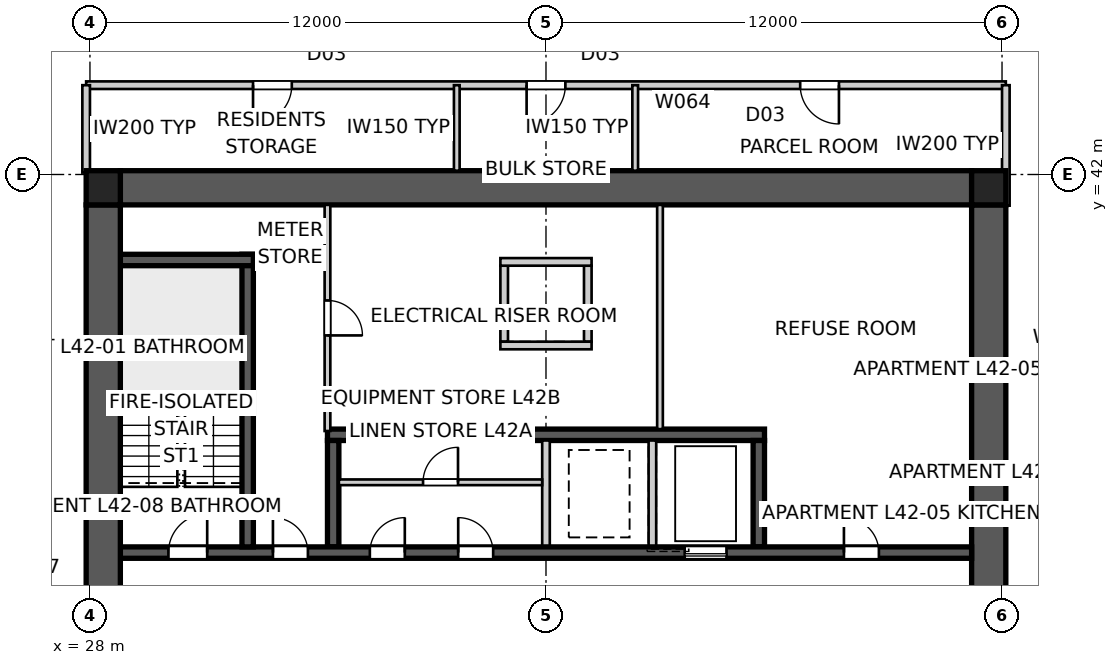
"""IFC4 building model, lengths in metres.
Left out: names, types, materials, properties, quantities, classifications, styles, units other than length and angle.
Written with IfcOpenShell. Run it as: python <this file> out.ifc"""

import sys

from ifc_helpers import new_model, si_unit, direction, frame, frame_2d, origin, origin_2d, place, context, subcontext, project, spatial, polyline, rectangle, outline, extrude, element, fill, save


model = new_model("IFC4")
c1 = context("Model", 3, precision=1e-05, world=origin(), true_north=direction((0.0, 1.0)))
c2 = subcontext(c1, "Body", "Model", "MODEL_VIEW")
j1 = project(units=[si_unit("LENGTHUNIT", "METRE"), si_unit("PLANEANGLEUNIT", "RADIAN")], contexts=[c1])
p1 = place(None, origin())
s1 = spatial("IfcSite", under=j1, at=p1, CompositionType="ELEMENT")
p2 = place(p1, origin())
s2 = spatial("IfcBuilding", under=s1, at=p2, CompositionType="ELEMENT")
p3 = place(p2, frame((0.0, 0.0, 154.0)))
s3 = spatial("IfcBuildingStorey", under=s2, at=p3, CompositionType="ELEMENT", Elevation=154.0)
p4 = place(p3, frame((28.8, 41.65, 0.0), z_axis=(0.0, 0.0, 1.0), x_axis=(1.0, 0.0, 0.0)))
e1 = element("IfcWall", 1, at=p4, inside=s3, PredefinedType="SHEAR", context=c2, shape_type="SweptSolid", body=[
    extrude(outline(polyline([(0.0, -0.45), (22.4, -0.45), (22.4, -0.025), (22.85, -0.025), (22.85, 0.025), (22.4, 0.025), (22.4, 0.45), (0.0, 0.45), (0.0, 0.025), (-0.45, 0.025), (-0.45, -0.025), (0.0, -0.025), (0.0, -0.45)])), origin(), (0.0, 0.0, 1.0), 3.4),
])
p5 = place(p3, frame((51.65, 18.8, 0.0), z_axis=(0.0, 0.0, 1.0), x_axis=(0.0, 1.0, 0.0)))
e2 = element("IfcWall", 2, at=p5, inside=s3, PredefinedType="SHEAR", context=c2, shape_type="SweptSolid", body=[
    extrude(outline(polyline([(0.0, -0.45), (22.4, -0.45), (22.4, -0.025), (22.85, -0.025), (22.85, 0.025), (22.4, 0.025), (22.4, 0.45), (0.0, 0.45), (0.0, 0.025), (-0.45, 0.025), (-0.45, -0.025), (0.0, -0.025), (0.0, -0.45)])), origin(), (0.0, 0.0, 1.0), 3.4),
])
p6 = place(p5, frame((11.14, 0.0, 0.0)))
e3 = element("IfcOpeningElement", 3, at=p6, cuts=e2, PredefinedType="OPENING", context=c2, shape_type="SweptSolid", body=[
    extrude(rectangle(XDim=1.02, YDim=2.4, at=frame_2d((0.51, 1.2))), frame((0.0, 0.46, 0.0), z_axis=(0.0, -1.0, 0.0), x_axis=(1.0, 0.0, 0.0)), (0.0, 0.0, 1.0), 0.92),
])
p7 = place(p3, frame((28.35, 41.2, 0.0), z_axis=(0.0, 0.0, 1.0), x_axis=(0.0, -1.0, 0.0)))
e4 = element("IfcWall", 4, at=p7, inside=s3, PredefinedType="SHEAR", context=c2, shape_type="SweptSolid", body=[
    extrude(outline(polyline([(0.0, -0.45), (22.4, -0.45), (22.4, -0.025), (22.85, -0.025), (22.85, 0.025), (22.4, 0.025), (22.4, 0.45), (0.0, 0.45), (0.0, 0.025), (-0.45, 0.025), (-0.45, -0.025), (0.0, -0.025), (0.0, -0.45)])), origin(), (0.0, 0.0, 1.0), 3.4),
])
p8 = place(p7, frame((11.14, 0.0, 0.0)))
e5 = element("IfcOpeningElement", 5, at=p8, cuts=e4, PredefinedType="OPENING", context=c2, shape_type="SweptSolid", body=[
    extrude(rectangle(XDim=1.02, YDim=2.4, at=frame_2d((0.51, 1.2))), frame((0.0, 0.46, 0.0), z_axis=(0.0, -1.0, 0.0), x_axis=(1.0, 0.0, 0.0)), (0.0, 0.0, 1.0), 0.92),
])
p9 = place(p3, frame((28.8, 32.05, 0.0), z_axis=(0.0, 0.0, 1.0), x_axis=(1.0, 0.0, 0.0)))
e6 = element("IfcWall", 6, at=p9, inside=s3, PredefinedType="SHEAR", context=c2, shape_type="SweptSolid", body=[
    extrude(rectangle(XDim=22.4, YDim=0.3, at=frame_2d((11.2, 0.0))), origin(), (0.0, 0.0, 1.0), 3.4),
])
p10 = place(p9, frame((19.04, 0.0, 0.0)))
e7 = element("IfcOpeningElement", 7, at=p10, cuts=e6, PredefinedType="OPENING", context=c2, shape_type="SweptSolid", body=[
    extrude(rectangle(XDim=0.92, YDim=2.1, at=frame_2d((0.46, 1.05))), frame((0.0, 0.16, 0.0), z_axis=(0.0, -1.0, 0.0), x_axis=(1.0, 0.0, 0.0)), (0.0, 0.0, 1.0), 0.32),
])
p11 = place(p9, frame((1.265, 0.0, 0.0)))
e8 = element("IfcOpeningElement", 8, at=p11, cuts=e6, PredefinedType="OPENING", context=c2, shape_type="SweptSolid", body=[
    extrude(rectangle(XDim=1.02, YDim=2.1, at=frame_2d((0.51, 1.05))), frame((0.0, 0.16, 0.0), z_axis=(0.0, -1.0, 0.0), x_axis=(1.0, 0.0, 0.0)), (0.0, 0.0, 1.0), 0.32),
])
p12 = place(p9, frame((4.015, 0.0, 0.0)))
e9 = element("IfcOpeningElement", 9, at=p12, cuts=e6, PredefinedType="OPENING", context=c2, shape_type="SweptSolid", body=[
    extrude(rectangle(XDim=0.92, YDim=2.1, at=frame_2d((0.46, 1.05))), frame((0.0, 0.16, 0.0), z_axis=(0.0, -1.0, 0.0), x_axis=(1.0, 0.0, 0.0)), (0.0, 0.0, 1.0), 0.32),
])
p13 = place(p9, frame((6.565, 0.0, 0.0)))
e10 = element("IfcOpeningElement", 10, at=p13, cuts=e6, PredefinedType="OPENING", context=c2, shape_type="SweptSolid", body=[
    extrude(rectangle(XDim=0.92, YDim=2.1, at=frame_2d((0.46, 1.05))), frame((0.0, 0.16, 0.0), z_axis=(0.0, -1.0, 0.0), x_axis=(1.0, 0.0, 0.0)), (0.0, 0.0, 1.0), 0.32),
])
p14 = place(p9, frame((8.89, 0.0, 0.0)))
e11 = element("IfcOpeningElement", 11, at=p14, cuts=e6, PredefinedType="OPENING", context=c2, shape_type="SweptSolid", body=[
    extrude(rectangle(XDim=0.92, YDim=2.1, at=frame_2d((0.46, 1.05))), frame((0.0, 0.16, 0.0), z_axis=(0.0, -1.0, 0.0), x_axis=(1.0, 0.0, 0.0)), (0.0, 0.0, 1.0), 0.32),
])
p15 = place(p9, frame((14.85, 0.0, 0.0)))
e12 = element("IfcOpeningElement", 12, at=p15, cuts=e6, PredefinedType="OPENING", context=c2, shape_type="SweptSolid", body=[
    extrude(rectangle(XDim=1.1, YDim=2.1, at=frame_2d((0.55, 1.05))), frame((0.0, 0.16, 0.0), z_axis=(0.0, -1.0, 0.0), x_axis=(1.0, 0.0, 0.0)), (0.0, 0.0, 1.0), 0.32),
])
p16 = place(p3, frame((34.25, 35.15, 0.0), z_axis=(0.0, 0.0, 1.0), x_axis=(1.0, 0.0, 0.0)))
e13 = element("IfcWall", 13, at=p16, inside=s3, PredefinedType="SHEAR", context=c2, shape_type="SweptSolid", body=[
    extrude(rectangle(XDim=11.5, YDim=0.3, at=frame_2d((5.75, 0.0))), origin(), (0.0, 0.0, 1.0), 3.4),
])
p17 = place(p3, frame((34.4, 32.2, 0.0), z_axis=(0.0, 0.0, 1.0), x_axis=(0.0, 1.0, 0.0)))
e14 = element("IfcWall", 14, at=p17, inside=s3, PredefinedType="SHEAR", context=c2, shape_type="SweptSolid", body=[
    extrude(rectangle(XDim=2.8, YDim=0.3, at=frame_2d((1.4, 0.0))), origin(), (0.0, 0.0, 1.0), 3.4),
])
for number, where, z_axis, x_axis in (
    (15, (40.0, 32.2, 0.0), (0.0, 0.0, 1.0), (0.0, 1.0, 0.0)),
    (16, (42.8, 32.2, 0.0), (0.0, 0.0, 1.0), (0.0, 1.0, 0.0)),
):
    element("IfcWall", number, at=place(p3, frame(where, z_axis=z_axis, x_axis=x_axis)), inside=s3, PredefinedType="SOLIDWALL", context=c2, shape_type="SweptSolid", body=[
        extrude(rectangle(XDim=2.8, YDim=0.2, at=frame_2d((1.4, 0.0))), origin(), (0.0, 0.0, 1.0), 3.4),
    ])
p18 = place(p3, frame((45.6, 32.2, 0.0), z_axis=(0.0, 0.0, 1.0), x_axis=(0.0, 1.0, 0.0)))
e17 = element("IfcWall", 17, at=p18, inside=s3, PredefinedType="SHEAR", context=c2, shape_type="SweptSolid", body=[
    extrude(rectangle(XDim=2.8, YDim=0.3, at=frame_2d((1.4, 0.0))), origin(), (0.0, 0.0, 1.0), 3.4),
])
p19 = place(p3, frame((32.15, 32.2, 0.0), z_axis=(0.0, 0.0, 1.0), x_axis=(0.0, 1.0, 0.0)))
e18 = element("IfcWall", 18, at=p19, inside=s3, PredefinedType="SHEAR", context=c2, shape_type="SweptSolid", body=[
    extrude(rectangle(XDim=7.7, YDim=0.3, at=frame_2d((3.85, 0.0))), origin(), (0.0, 0.0, 1.0), 3.4),
])
p20 = place(p3, frame((28.8, 39.75, 0.0), z_axis=(0.0, 0.0, 1.0), x_axis=(1.0, 0.0, 0.0)))
e19 = element("IfcWall", 19, at=p20, inside=s3, PredefinedType="SHEAR", context=c2, shape_type="SweptSolid", body=[
    extrude(rectangle(XDim=3.5, YDim=0.3, at=frame_2d((1.75, 0.0))), origin(), (0.0, 0.0, 1.0), 3.4),
])
for number, where, z_axis, x_axis in (
    (20, (38.9, 37.6, 0.0), (0.0, 0.0, 1.0), (0.0, 1.0, 0.0)),
    (21, (41.1, 37.6, 0.0), (0.0, 0.0, 1.0), (0.0, 1.0, 0.0)),
):
    element("IfcWall", number, at=place(p3, frame(where, z_axis=z_axis, x_axis=x_axis)), inside=s3, PredefinedType="SOLIDWALL", context=c2, shape_type="SweptSolid", body=[
        extrude(rectangle(XDim=2.0, YDim=0.2, at=frame_2d((1.0, 0.0))), origin(), (0.0, 0.0, 1.0), 3.4),
    ])
for number, where, z_axis, x_axis in (
    (22, (38.8, 37.5, 0.0), (0.0, 0.0, 1.0), (1.0, 0.0, 0.0)),
    (23, (38.8, 39.7, 0.0), (0.0, 0.0, 1.0), (1.0, 0.0, 0.0)),
):
    element("IfcWall", number, at=place(p3, frame(where, z_axis=z_axis, x_axis=x_axis)), inside=s3, PredefinedType="SOLIDWALL", context=c2, shape_type="SweptSolid", body=[
        extrude(rectangle(XDim=2.4, YDim=0.2, at=frame_2d((1.2, 0.0))), origin(), (0.0, 0.0, 1.0), 3.4),
    ])
for number, where, z_axis, x_axis in (
    (24, (51.65, 41.65, 0.0), (0.0, 0.0, 1.0), (1.0, 0.0, 0.0)),
    (25, (28.35, 41.65, 0.0), (0.0, 0.0, 1.0), (1.0, 0.0, 0.0)),
):
    element("IfcColumn", number, at=place(p3, frame(where, z_axis=z_axis, x_axis=x_axis)), inside=s3, PredefinedType="COLUMN", context=c2, shape_type="SweptSolid", body=[
        extrude(rectangle(XDim=0.9, YDim=0.9, at=origin_2d()), origin(), (0.0, 0.0, 1.0), 3.4),
    ])
p21 = place(p3, frame((34.25, 41.2, 0.0), z_axis=(0.0, 0.0, 1.0), x_axis=(0.0, -1.0, 0.0)))
e26 = element("IfcWall", 26, at=p21, inside=s3, PredefinedType="SOLIDWALL", context=c2, shape_type="SweptSolid", body=[
    extrude(rectangle(XDim=5.95, YDim=0.15, at=frame_2d((2.975, 0.0))), origin(), (0.0, 0.0, 1.0), 3.25),
])
p22 = place(p21, frame((2.515, 0.0, 0.0)))
e27 = element("IfcOpeningElement", 27, at=p22, cuts=e26, PredefinedType="OPENING", context=c2, shape_type="SweptSolid", body=[
    extrude(rectangle(XDim=0.92, YDim=2.1, at=frame_2d((0.46, 1.05))), frame((0.0, 0.085, 0.0), z_axis=(0.0, -1.0, 0.0), x_axis=(1.0, 0.0, 0.0)), (0.0, 0.0, 1.0), 0.17),
])
p23 = place(p3, frame((43.0, 41.2, 0.0), z_axis=(0.0, 0.0, 1.0), x_axis=(0.0, -1.0, 0.0)))
e28 = element("IfcWall", 28, at=p23, inside=s3, PredefinedType="SOLIDWALL", context=c2, shape_type="SweptSolid", body=[
    extrude(rectangle(XDim=5.9, YDim=0.15, at=frame_2d((2.95, 0.0))), origin(), (0.0, 0.0, 1.0), 3.25),
])
p24 = place(p3, frame((52.1, 44.35, 0.0), z_axis=(0.0, 0.0, 1.0), x_axis=(-1.0, 0.0, 0.0)))
e29 = element("IfcWall", 29, at=p24, inside=s3, PredefinedType="PARTITIONING", context=c2, shape_type="SweptSolid", body=[
    extrude(rectangle(XDim=24.2, YDim=0.2, at=frame_2d((12.1, 0.0))), origin(), (0.0, 0.0, 1.0), 3.25),
])
p25 = place(p24, frame((18.789, 0.0, 0.0)))
e30 = element("IfcOpeningElement", 30, at=p25, cuts=e29, PredefinedType="OPENING", context=c2, shape_type="SweptSolid", body=[
    extrude(rectangle(XDim=1.02, YDim=2.1, at=frame_2d((0.51, 1.05))), frame((0.0, 0.11, 0.0), z_axis=(0.0, -1.0, 0.0), x_axis=(1.0, 0.0, 0.0)), (0.0, 0.0, 1.0), 0.22),
])
p26 = place(p24, frame((4.391, 0.0, 0.0)))
e31 = element("IfcOpeningElement", 31, at=p26, cuts=e29, PredefinedType="OPENING", context=c2, shape_type="SweptSolid", body=[
    extrude(rectangle(XDim=1.02, YDim=2.1, at=frame_2d((0.51, 1.05))), frame((0.0, 0.11, 0.0), z_axis=(0.0, -1.0, 0.0), x_axis=(1.0, 0.0, 0.0)), (0.0, 0.0, 1.0), 0.22),
])
p27 = place(p24, frame((11.59, 0.0, 0.0)))
e32 = element("IfcOpeningElement", 32, at=p27, cuts=e29, PredefinedType="OPENING", context=c2, shape_type="SweptSolid", body=[
    extrude(rectangle(XDim=1.02, YDim=2.1, at=frame_2d((0.51, 1.05))), frame((0.0, 0.11, 0.0), z_axis=(0.0, -1.0, 0.0), x_axis=(1.0, 0.0, 0.0)), (0.0, 0.0, 1.0), 0.22),
])
p28 = place(p3, frame((27.9, 44.35, 0.0), z_axis=(0.0, 0.0, 1.0), x_axis=(0.0, -1.0, 0.0)))
e33 = element("IfcWall", 33, at=p28, inside=s3, PredefinedType="PARTITIONING", context=c2, shape_type="SweptSolid", body=[
    extrude(rectangle(XDim=2.3, YDim=0.2, at=frame_2d((1.15, 0.0))), origin(), (0.0, 0.0, 1.0), 3.25),
])
p29 = place(p3, frame((52.1, 41.18, 0.0), z_axis=(0.0, 0.0, 1.0), x_axis=(0.0, 1.0, 0.0)))
e34 = element("IfcWall", 34, at=p29, inside=s3, PredefinedType="PARTITIONING", context=c2, shape_type="SweptSolid", body=[
    extrude(rectangle(XDim=3.17, YDim=0.2, at=frame_2d((1.585, 0.0))), origin(), (0.0, 0.0, 1.0), 3.25),
])
for number, where, z_axis, x_axis in (
    (35, (37.653, 42.1, 0.0), (0.0, 0.0, 1.0), (0.0, 1.0, 0.0)),
    (36, (42.347, 42.1, 0.0), (0.0, 0.0, 1.0), (0.0, 1.0, 0.0)),
):
    element("IfcWall", number, at=place(p3, frame(where, z_axis=z_axis, x_axis=x_axis)), inside=s3, PredefinedType="SOLIDWALL", context=c2, shape_type="SweptSolid", body=[
        extrude(rectangle(XDim=2.25, YDim=0.15, at=frame_2d((1.125, 0.0))), origin(), (0.0, 0.0, 1.0), 3.25),
    ])
p30 = place(p3, frame((34.55, 33.9, 0.0), z_axis=(0.0, 0.0, 1.0), x_axis=(1.0, 0.0, 0.0)))
e37 = element("IfcWall", 37, at=p30, inside=s3, PredefinedType="SOLIDWALL", context=c2, shape_type="SweptSolid", body=[
    extrude(rectangle(XDim=5.35, YDim=0.15, at=frame_2d((2.675, 0.0))), origin(), (0.0, 0.0, 1.0), 3.25),
])
p31 = place(p30, frame((2.215, 0.0, 0.0)))
e38 = element("IfcOpeningElement", 38, at=p31, cuts=e37, PredefinedType="OPENING", context=c2, shape_type="SweptSolid", body=[
    extrude(rectangle(XDim=0.92, YDim=2.1, at=frame_2d((0.46, 1.05))), frame((0.0, 0.085, 0.0), z_axis=(0.0, -1.0, 0.0), x_axis=(1.0, 0.0, 0.0)), (0.0, 0.0, 1.0), 0.17),
])
p32 = place(p10, origin())
e39 = element("IfcDoor", 39, at=p32, inside=s3, OperationType="SINGLE_SWING_LEFT", PredefinedType="DOOR", context=c2, shape_type="SweptSolid", body=[
    extrude(rectangle(XDim=0.92, YDim=2.1, at=frame_2d((0.46, 1.05))), frame((0.0, 0.025, 0.0), z_axis=(0.0, -1.0, 0.0), x_axis=(1.0, 0.0, 0.0)), (0.0, 0.0, 1.0), 0.05),
])
fill(e7, e39)
p33 = place(p11, origin())
e40 = element("IfcDoor", 40, at=p33, inside=s3, OperationType="SINGLE_SWING_RIGHT", PredefinedType="DOOR", context=c2, shape_type="SweptSolid", body=[
    extrude(rectangle(XDim=1.02, YDim=2.1, at=frame_2d((0.51, 1.05))), frame((0.0, 0.025, 0.0), z_axis=(0.0, -1.0, 0.0), x_axis=(1.0, 0.0, 0.0)), (0.0, 0.0, 1.0), 0.05),
])
fill(e8, e40)
p34 = place(p12, origin())
e41 = element("IfcDoor", 41, at=p34, inside=s3, OperationType="SINGLE_SWING_LEFT", PredefinedType="DOOR", context=c2, shape_type="SweptSolid", body=[
    extrude(rectangle(XDim=0.92, YDim=2.1, at=frame_2d((0.46, 1.05))), frame((0.0, 0.025, 0.0), z_axis=(0.0, -1.0, 0.0), x_axis=(1.0, 0.0, 0.0)), (0.0, 0.0, 1.0), 0.05),
])
fill(e9, e41)
p35 = place(p25, origin())
e42 = element("IfcDoor", 42, at=p35, inside=s3, OperationType="SINGLE_SWING_RIGHT", PredefinedType="DOOR", context=c2, shape_type="SweptSolid", body=[
    extrude(rectangle(XDim=1.02, YDim=2.1, at=frame_2d((0.51, 1.05))), frame((0.0, 0.025, 0.0), z_axis=(0.0, -1.0, 0.0), x_axis=(1.0, 0.0, 0.0)), (0.0, 0.0, 1.0), 0.05),
])
fill(e30, e42)
p36 = place(p26, origin())
e43 = element("IfcDoor", 43, at=p36, inside=s3, OperationType="SINGLE_SWING_LEFT", PredefinedType="DOOR", context=c2, shape_type="SweptSolid", body=[
    extrude(rectangle(XDim=1.02, YDim=2.1, at=frame_2d((0.51, 1.05))), frame((0.0, 0.025, 0.0), z_axis=(0.0, -1.0, 0.0), x_axis=(1.0, 0.0, 0.0)), (0.0, 0.0, 1.0), 0.05),
])
fill(e31, e43)
p37 = place(p27, origin())
e44 = element("IfcDoor", 44, at=p37, inside=s3, OperationType="SINGLE_SWING_RIGHT", PredefinedType="DOOR", context=c2, shape_type="SweptSolid", body=[
    extrude(rectangle(XDim=1.02, YDim=2.1, at=frame_2d((0.51, 1.05))), frame((0.0, 0.025, 0.0), z_axis=(0.0, -1.0, 0.0), x_axis=(1.0, 0.0, 0.0)), (0.0, 0.0, 1.0), 0.05),
])
fill(e32, e44)
p38 = place(p22, origin())
e45 = element("IfcDoor", 45, at=p38, inside=s3, OperationType="SINGLE_SWING_RIGHT", PredefinedType="DOOR", context=c2, shape_type="SweptSolid", body=[
    extrude(rectangle(XDim=0.92, YDim=2.1, at=frame_2d((0.46, 1.05))), frame((0.0, 0.025, 0.0), z_axis=(0.0, -1.0, 0.0), x_axis=(1.0, 0.0, 0.0)), (0.0, 0.0, 1.0), 0.05),
])
fill(e27, e45)
p39 = place(p13, origin())
e46 = element("IfcDoor", 46, at=p39, inside=s3, OperationType="SINGLE_SWING_RIGHT", PredefinedType="DOOR", context=c2, shape_type="SweptSolid", body=[
    extrude(rectangle(XDim=0.92, YDim=2.1, at=frame_2d((0.46, 1.05))), frame((0.0, 0.025, 0.0), z_axis=(0.0, -1.0, 0.0), x_axis=(1.0, 0.0, 0.0)), (0.0, 0.0, 1.0), 0.05),
])
fill(e10, e46)
p40 = place(p14, origin())
e47 = element("IfcDoor", 47, at=p40, inside=s3, OperationType="SINGLE_SWING_LEFT", PredefinedType="DOOR", context=c2, shape_type="SweptSolid", body=[
    extrude(rectangle(XDim=0.92, YDim=2.1, at=frame_2d((0.46, 1.05))), frame((0.0, 0.025, 0.0), z_axis=(0.0, -1.0, 0.0), x_axis=(1.0, 0.0, 0.0)), (0.0, 0.0, 1.0), 0.05),
])
fill(e11, e47)
p41 = place(p31, origin())
e48 = element("IfcDoor", 48, at=p41, inside=s3, OperationType="SINGLE_SWING_RIGHT", PredefinedType="DOOR", context=c2, shape_type="SweptSolid", body=[
    extrude(rectangle(XDim=0.92, YDim=2.1, at=frame_2d((0.46, 1.05))), frame((0.0, 0.025, 0.0), z_axis=(0.0, -1.0, 0.0), x_axis=(1.0, 0.0, 0.0)), (0.0, 0.0, 1.0), 0.05),
])
fill(e38, e48)
p42 = place(p15, origin())
e49 = element("IfcDoor", 49, at=p42, inside=s3, OperationType="SLIDING_TO_LEFT", PredefinedType="DOOR", context=c2, shape_type="SweptSolid", body=[
    extrude(rectangle(XDim=1.1, YDim=2.1, at=frame_2d((0.55, 1.05))), frame((0.0, 0.025, 0.0), z_axis=(0.0, -1.0, 0.0), x_axis=(1.0, 0.0, 0.0)), (0.0, 0.0, 1.0), 0.05),
])
fill(e12, e49)
save(model, sys.argv[1])
